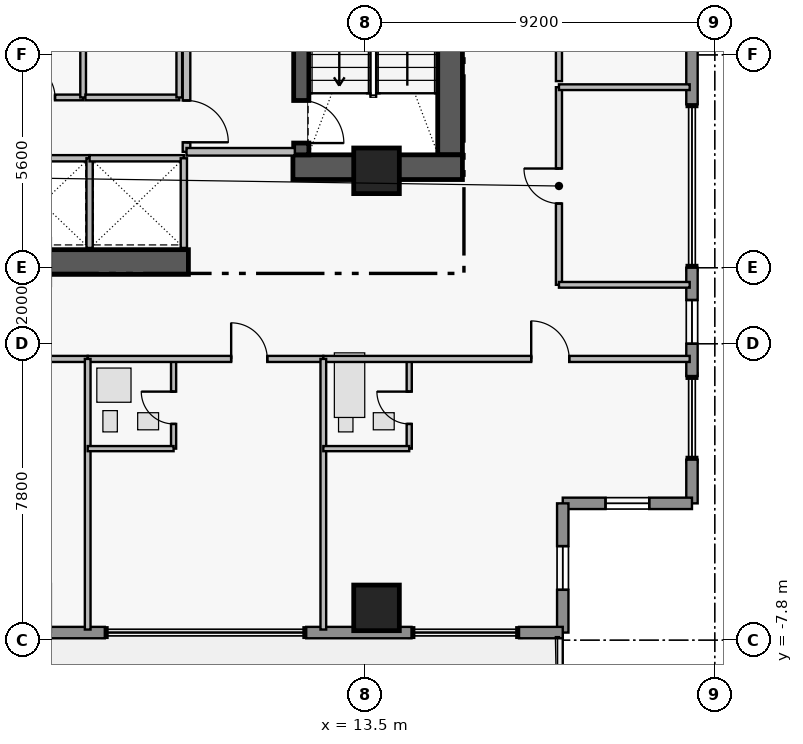
"""IFC4 building model, lengths in metres.
Left out: names, types, materials, properties, quantities, classifications, styles, units other than length and angle.
Written with IfcOpenShell. Run it as: python <this file> out.ifc"""

import sys

from ifc_helpers import new_model, si_unit, direction, frame, frame_2d, origin, origin_2d, place, context, subcontext, project, spatial, rectangle, extrude, element, fill, save


model = new_model("IFC4")
c1 = context("Model", 3, precision=1e-05, world=origin(), true_north=direction((0.0, 1.0)))
c2 = subcontext(c1, "Body", "Model", "MODEL_VIEW")
j1 = project(units=[si_unit("LENGTHUNIT", "METRE"), si_unit("PLANEANGLEUNIT", "RADIAN")], contexts=[c1])
p1 = place(None, origin())
s1 = spatial("IfcSite", under=j1, at=p1, CompositionType="ELEMENT")
p2 = place(p1, origin())
s2 = spatial("IfcBuilding", under=s1, at=p2, CompositionType="ELEMENT")
p3 = place(p2, frame((0.0, 0.0, 192.4)))
s3 = spatial("IfcBuildingStorey", under=s2, at=p3, CompositionType="ELEMENT", Elevation=192.4)
p4 = place(p3, frame((15.735, 4.97, 0.0), z_axis=(0.0, 0.0, 1.0), x_axis=(0.0, 1.0, 0.0)))
e1 = element("IfcWall", 1, at=p4, inside=s3, PredefinedType="SHEAR", context=c2, shape_type="SweptSolid", body=[
    extrude(rectangle(XDim=8.96, YDim=0.65, at=frame_2d((4.48, 0.0))), origin(), (0.0, 0.0, 1.0), 3.56),
])
p5 = place(p3, frame((11.6, 4.645, 0.0), z_axis=(0.0, 0.0, 1.0), x_axis=(1.0, 0.0, 0.0)))
e2 = element("IfcWall", 2, at=p5, inside=s3, PredefinedType="SHEAR", context=c2, shape_type="SweptSolid", body=[
    extrude(rectangle(XDim=4.46, YDim=0.65, at=frame_2d((2.23, 0.0))), origin(), (0.0, 0.0, 1.0), 3.56),
])
p6 = place(p3, frame((1.25, 2.15, 0.0), z_axis=(0.0, 0.0, 1.0), x_axis=(1.0, 0.0, 0.0)))
e3 = element("IfcWall", 3, at=p6, inside=s3, PredefinedType="SHEAR", context=c2, shape_type="SweptSolid", body=[
    extrude(rectangle(XDim=7.6, YDim=0.65, at=frame_2d((3.8, 0.0))), origin(), (0.0, 0.0, 1.0), 3.53),
])
p7 = place(p3, frame((11.82, 13.93, 0.0), z_axis=(0.0, 0.0, 1.0), x_axis=(0.0, -1.0, 0.0)))
e4 = element("IfcWall", 4, at=p7, inside=s3, PredefinedType="SHEAR", context=c2, shape_type="SweptSolid", body=[
    extrude(rectangle(XDim=8.96, YDim=0.4, at=frame_2d((4.48, 0.0))), origin(), (0.0, 0.0, 1.0), 3.56),
])
p8 = place(p7, frame((7.53, 0.0, 0.0)))
e5 = element("IfcOpeningElement", 5, at=p8, cuts=e4, PredefinedType="OPENING", context=c2, shape_type="SweptSolid", body=[
    extrude(rectangle(XDim=1.12, YDim=2.22, at=frame_2d((0.56, 1.11))), frame((0.0, 0.21, 0.0), z_axis=(0.0, -1.0, 0.0), x_axis=(1.0, 0.0, 0.0)), (0.0, 0.0, 1.0), 0.42),
])
for number, where, z_axis, x_axis in (
    (6, (13.8, 4.55, 0.0), (0.0, 0.0, 1.0), (1.0, 0.0, 0.0)),
    (7, (13.8, -6.95, 0.0), (0.0, 0.0, 1.0), (1.0, 0.0, 0.0)),
):
    element("IfcColumn", number, at=place(p3, frame(where, z_axis=z_axis, x_axis=x_axis)), inside=s3, PredefinedType="COLUMN", context=c2, shape_type="SweptSolid", body=[
        extrude(rectangle(XDim=1.2, YDim=1.2, at=origin_2d()), origin(), (0.0, 0.0, 1.0), 3.75),
    ])
p9 = place(p3, frame((22.1, 8.2, 0.0), z_axis=(0.0, 0.0, 1.0), x_axis=(0.0, -1.0, 0.0)))
e8 = element("IfcWall", 8, at=p9, inside=s3, PredefinedType="STANDARD", context=c2, shape_type="SweptSolid", body=[
    extrude(rectangle(XDim=1.9, YDim=0.3, at=frame_2d((0.95, 0.0))), origin(), (0.0, 0.0, 1.0), 3.53),
])
p10 = place(p3, frame((22.1, 2.0, 0.0), z_axis=(0.0, 0.0, 1.0), x_axis=(0.0, -1.0, 0.0)))
e9 = element("IfcWall", 9, at=p10, inside=s3, PredefinedType="STANDARD", context=c2, shape_type="SweptSolid", body=[
    extrude(rectangle(XDim=2.85, YDim=0.3, at=frame_2d((1.425, 0.0))), origin(), (0.0, 0.0, 1.0), 3.53),
])
p11 = place(p10, frame((0.85, 0.0, 0.95)))
e10 = element("IfcOpeningElement", 10, at=p11, cuts=e9, PredefinedType="OPENING", context=c2, shape_type="SweptSolid", body=[
    extrude(rectangle(XDim=1.15, YDim=1.55, at=frame_2d((0.575, 0.775))), frame((0.0, 0.16, 0.0), z_axis=(0.0, -1.0, 0.0), x_axis=(1.0, 0.0, 0.0)), (0.0, 0.0, 1.0), 0.32),
])
p12 = place(p3, frame((22.1, -3.05, 0.0), z_axis=(0.0, 0.0, 1.0), x_axis=(0.0, -1.0, 0.0)))
e11 = element("IfcWall", 11, at=p12, inside=s3, PredefinedType="STANDARD", context=c2, shape_type="SweptSolid", body=[
    extrude(rectangle(XDim=1.15, YDim=0.3, at=frame_2d((0.575, 0.0))), origin(), (0.0, 0.0, 1.0), 3.53),
])
p13 = place(p3, frame((22.1, -4.2, 0.0), z_axis=(0.0, 0.0, 1.0), x_axis=(-1.0, 0.0, 0.0)))
e12 = element("IfcWall", 12, at=p13, inside=s3, PredefinedType="STANDARD", context=c2, shape_type="SweptSolid", body=[
    extrude(rectangle(XDim=3.4, YDim=0.3, at=frame_2d((1.7, 0.0))), origin(), (0.0, 0.0, 1.0), 3.53),
])
p14 = place(p13, frame((1.125, 0.0, 1.25)))
e13 = element("IfcOpeningElement", 13, at=p14, cuts=e12, PredefinedType="OPENING", context=c2, shape_type="SweptSolid", body=[
    extrude(rectangle(XDim=1.15, YDim=1.55, at=frame_2d((0.575, 0.775))), frame((0.0, 0.16, 0.0), z_axis=(0.0, -1.0, 0.0), x_axis=(1.0, 0.0, 0.0)), (0.0, 0.0, 1.0), 0.32),
])
p15 = place(p3, frame((18.7, -4.2, 0.0), z_axis=(0.0, 0.0, 1.0), x_axis=(0.0, -1.0, 0.0)))
e14 = element("IfcWall", 14, at=p15, inside=s3, PredefinedType="STANDARD", context=c2, shape_type="SweptSolid", body=[
    extrude(rectangle(XDim=3.4, YDim=0.3, at=frame_2d((1.7, 0.0))), origin(), (0.0, 0.0, 1.0), 3.53),
])
p16 = place(p15, frame((1.125, 0.0, 1.25)))
e15 = element("IfcOpeningElement", 15, at=p16, cuts=e14, PredefinedType="OPENING", context=c2, shape_type="SweptSolid", body=[
    extrude(rectangle(XDim=1.15, YDim=1.55, at=frame_2d((0.575, 0.775))), frame((0.0, 0.16, 0.0), z_axis=(0.0, -1.0, 0.0), x_axis=(1.0, 0.0, 0.0)), (0.0, 0.0, 1.0), 0.32),
])
p17 = place(p3, frame((18.7, -7.6, 0.0), z_axis=(0.0, 0.0, 1.0), x_axis=(-1.0, 0.0, 0.0)))
e16 = element("IfcWall", 16, at=p17, inside=s3, PredefinedType="STANDARD", context=c2, shape_type="SweptSolid", body=[
    extrude(rectangle(XDim=1.15, YDim=0.3, at=frame_2d((0.575, 0.0))), origin(), (0.0, 0.0, 1.0), 3.53),
])
p18 = place(p3, frame((14.72, -7.6, 0.0), z_axis=(0.0, 0.0, 1.0), x_axis=(-1.0, 0.0, 0.0)))
e17 = element("IfcWall", 17, at=p18, inside=s3, PredefinedType="STANDARD", context=c2, shape_type="SweptSolid", body=[
    extrude(rectangle(XDim=2.77, YDim=0.3, at=frame_2d((1.385, 0.0))), origin(), (0.0, 0.0, 1.0), 3.53),
])
p19 = place(p3, frame((6.65, -7.6, 0.0), z_axis=(0.0, 0.0, 1.0), x_axis=(-1.0, 0.0, 0.0)))
e18 = element("IfcWall", 18, at=p19, inside=s3, PredefinedType="STANDARD", context=c2, shape_type="SweptSolid", body=[
    extrude(rectangle(XDim=2.97, YDim=0.3, at=frame_2d((1.485, 0.0))), origin(), (0.0, 0.0, 1.0), 3.53),
])
p20 = place(p3, frame((8.8, 11.15, 0.0), z_axis=(0.0, 0.0, 1.0), x_axis=(0.0, -1.0, 0.0)))
e19 = element("IfcWall", 19, at=p20, inside=s3, PredefinedType="PARTITIONING", context=c2, shape_type="SweptSolid", body=[
    extrude(rectangle(XDim=6.1, YDim=0.2, at=frame_2d((3.05, 0.0))), origin(), (0.0, 0.0, 1.0), 3.53),
])
p21 = place(p20, frame((1.15, 0.0, 0.0)))
e20 = element("IfcOpeningElement", 20, at=p21, cuts=e19, PredefinedType="OPENING", context=c2, shape_type="SweptSolid", body=[
    extrude(rectangle(XDim=1.1, YDim=2.2, at=frame_2d((0.55, 1.1))), frame((0.0, 0.11, 0.0), z_axis=(0.0, -1.0, 0.0), x_axis=(1.0, 0.0, 0.0)), (0.0, 0.0, 1.0), 0.22),
])
p22 = place(p20, frame((4.75, 0.0, 0.0)))
e21 = element("IfcOpeningElement", 21, at=p22, cuts=e19, PredefinedType="OPENING", context=c2, shape_type="SweptSolid", body=[
    extrude(rectangle(XDim=1.1, YDim=2.2, at=frame_2d((0.55, 1.1))), frame((0.0, 0.11, 0.0), z_axis=(0.0, -1.0, 0.0), x_axis=(1.0, 0.0, 0.0)), (0.0, 0.0, 1.0), 0.22),
])
p23 = place(p3, frame((3.7, 6.48, 0.0), z_axis=(0.0, 0.0, 1.0), x_axis=(1.0, 0.0, 0.0)))
e22 = element("IfcWall", 22, at=p23, inside=s3, PredefinedType="PARTITIONING", context=c2, shape_type="SweptSolid", body=[
    extrude(rectangle(XDim=2.38, YDim=0.15, at=frame_2d((1.19, 0.0))), origin(), (0.0, 0.0, 1.0), 3.53),
])
p24 = place(p23, frame((0.74, 0.0, 0.0)))
e23 = element("IfcOpeningElement", 23, at=p24, cuts=e22, PredefinedType="OPENING", context=c2, shape_type="SweptSolid", body=[
    extrude(rectangle(XDim=0.9, YDim=2.15, at=frame_2d((0.45, 1.075))), frame((0.0, 0.085, 0.0), z_axis=(0.0, -1.0, 0.0), x_axis=(1.0, 0.0, 0.0)), (0.0, 0.0, 1.0), 0.17),
])
p25 = place(p3, frame((0.0, -0.4, 0.0), z_axis=(0.0, 0.0, 1.0), x_axis=(1.0, 0.0, 0.0)))
e24 = element("IfcWall", 24, at=p25, inside=s3, PredefinedType="PARTITIONING", context=c2, shape_type="SweptSolid", body=[
    extrude(rectangle(XDim=6.2, YDim=0.16, at=frame_2d((3.1, 0.0))), origin(), (0.0, 0.0, 1.0), 3.53),
])
p26 = place(p25, frame((3.775, 0.0, 0.0)))
e25 = element("IfcOpeningElement", 25, at=p26, cuts=e24, PredefinedType="OPENING", context=c2, shape_type="SweptSolid", body=[
    extrude(rectangle(XDim=0.95, YDim=2.15, at=frame_2d((0.475, 1.075))), frame((0.0, 0.09, 0.0), z_axis=(0.0, -1.0, 0.0), x_axis=(1.0, 0.0, 0.0)), (0.0, 0.0, 1.0), 0.18),
])
p27 = place(p3, frame((8.46, -2.76, 0.0), z_axis=(0.0, 0.0, 1.0), x_axis=(0.0, 1.0, 0.0)))
e26 = element("IfcWall", 26, at=p27, inside=s3, PredefinedType="PLUMBINGWALL", context=c2, shape_type="SweptSolid", body=[
    extrude(rectangle(XDim=2.36, YDim=0.135, at=frame_2d((1.18, 0.0))), origin(), (0.0, 0.0, 1.0), 3.53),
])
p28 = place(p27, frame((0.65, 0.0, 0.0)))
e27 = element("IfcOpeningElement", 27, at=p28, cuts=e26, PredefinedType="OPENING", context=c2, shape_type="SweptSolid", body=[
    extrude(rectangle(XDim=0.85, YDim=2.1, at=frame_2d((0.425, 1.05))), frame((0.0, 0.077, 0.0), z_axis=(0.0, -1.0, 0.0), x_axis=(1.0, 0.0, 0.0)), (0.0, 0.0, 1.0), 0.155),
])
p29 = place(p3, frame((6.2, -0.4, 0.0), z_axis=(0.0, 0.0, 1.0), x_axis=(1.0, 0.0, 0.0)))
e28 = element("IfcWall", 28, at=p29, inside=s3, PredefinedType="PARTITIONING", context=c2, shape_type="SweptSolid", body=[
    extrude(rectangle(XDim=6.2, YDim=0.16, at=frame_2d((3.1, 0.0))), origin(), (0.0, 0.0, 1.0), 3.53),
])
p30 = place(p29, frame((3.775, 0.0, 0.0)))
e29 = element("IfcOpeningElement", 29, at=p30, cuts=e28, PredefinedType="OPENING", context=c2, shape_type="SweptSolid", body=[
    extrude(rectangle(XDim=0.95, YDim=2.15, at=frame_2d((0.475, 1.075))), frame((0.0, 0.09, 0.0), z_axis=(0.0, -1.0, 0.0), x_axis=(1.0, 0.0, 0.0)), (0.0, 0.0, 1.0), 0.18),
])
p31 = place(p3, frame((14.66, -2.76, 0.0), z_axis=(0.0, 0.0, 1.0), x_axis=(0.0, 1.0, 0.0)))
e30 = element("IfcWall", 30, at=p31, inside=s3, PredefinedType="PLUMBINGWALL", context=c2, shape_type="SweptSolid", body=[
    extrude(rectangle(XDim=2.36, YDim=0.135, at=frame_2d((1.18, 0.0))), origin(), (0.0, 0.0, 1.0), 3.53),
])
p32 = place(p31, frame((0.65, 0.0, 0.0)))
e31 = element("IfcOpeningElement", 31, at=p32, cuts=e30, PredefinedType="OPENING", context=c2, shape_type="SweptSolid", body=[
    extrude(rectangle(XDim=0.85, YDim=2.1, at=frame_2d((0.425, 1.05))), frame((0.0, 0.077, 0.0), z_axis=(0.0, -1.0, 0.0), x_axis=(1.0, 0.0, 0.0)), (0.0, 0.0, 1.0), 0.155),
])
p33 = place(p3, frame((12.4, -0.4, 0.0), z_axis=(0.0, 0.0, 1.0), x_axis=(1.0, 0.0, 0.0)))
e32 = element("IfcWall", 32, at=p33, inside=s3, PredefinedType="PARTITIONING", context=c2, shape_type="SweptSolid", body=[
    extrude(rectangle(XDim=9.64, YDim=0.16, at=frame_2d((4.82, 0.0))), origin(), (0.0, 0.0, 1.0), 3.53),
])
p34 = place(p33, frame((5.47, 0.0, 0.0)))
e33 = element("IfcOpeningElement", 33, at=p34, cuts=e32, PredefinedType="OPENING", context=c2, shape_type="SweptSolid", body=[
    extrude(rectangle(XDim=1.0, YDim=2.15, at=frame_2d((0.5, 1.075))), frame((0.0, 0.09, 0.0), z_axis=(0.0, -1.0, 0.0), x_axis=(1.0, 0.0, 0.0)), (0.0, 0.0, 1.0), 0.18),
])
p35 = place(p3, frame((18.6, 1.55, 0.0), z_axis=(0.0, 0.0, 1.0), x_axis=(0.0, 1.0, 0.0)))
e34 = element("IfcWall", 34, at=p35, inside=s3, PredefinedType="PARTITIONING", context=c2, shape_type="SweptSolid", body=[
    extrude(rectangle(XDim=5.2, YDim=0.16, at=frame_2d((2.6, 0.0))), origin(), (0.0, 0.0, 1.0), 3.53),
])
p36 = place(p35, frame((2.14, 0.0, 0.0)))
e35 = element("IfcOpeningElement", 35, at=p36, cuts=e34, PredefinedType="OPENING", context=c2, shape_type="SweptSolid", body=[
    extrude(rectangle(XDim=0.92, YDim=2.12, at=frame_2d((0.46, 1.06))), frame((0.0, 0.09, 0.0), z_axis=(0.0, -1.0, 0.0), x_axis=(1.0, 0.0, 0.0)), (0.0, 0.0, 1.0), 0.18),
])
p37 = place(p3, frame((18.6, 6.91, 0.0), z_axis=(0.0, 0.0, 1.0), x_axis=(0.0, 1.0, 0.0)))
e36 = element("IfcWall", 36, at=p37, inside=s3, PredefinedType="PARTITIONING", context=c2, shape_type="SweptSolid", body=[
    extrude(rectangle(XDim=7.94, YDim=0.16, at=frame_2d((3.97, 0.0))), origin(), (0.0, 0.0, 1.0), 3.53),
])
p38 = place(p37, frame((3.51, 0.0, 0.0)))
e37 = element("IfcOpeningElement", 37, at=p38, cuts=e36, PredefinedType="OPENING", context=c2, shape_type="SweptSolid", body=[
    extrude(rectangle(XDim=0.92, YDim=2.12, at=frame_2d((0.46, 1.06))), frame((0.0, 0.09, 0.0), z_axis=(0.0, -1.0, 0.0), x_axis=(1.0, 0.0, 0.0)), (0.0, 0.0, 1.0), 0.18),
])
p39 = place(p3, frame((8.8, 5.05, 0.0), z_axis=(0.0, 0.0, 1.0), x_axis=(1.0, 0.0, 0.0)))
e38 = element("IfcWall", 38, at=p39, inside=s3, PredefinedType="PARTITIONING", context=c2, shape_type="SweptSolid", body=[
    extrude(rectangle(XDim=2.85, YDim=0.2, at=frame_2d((1.425, 0.0))), origin(), (0.0, 0.0, 1.0), 3.53),
])
p40 = place(p3, frame((3.75, 4.88, 0.0), z_axis=(0.0, 0.0, 1.0), x_axis=(1.0, 0.0, 0.0)))
e39 = element("IfcWall", 39, at=p40, inside=s3, PredefinedType="PARTITIONING", context=c2, shape_type="SweptSolid", body=[
    extrude(rectangle(XDim=2.5, YDim=0.165, at=frame_2d((1.25, 0.0))), origin(), (0.0, 0.0, 1.0), 3.53),
])
p41 = place(p3, frame((6.25, 2.52, 0.0), z_axis=(0.0, 0.0, 1.0), x_axis=(0.0, 1.0, 0.0)))
e40 = element("IfcWall", 40, at=p41, inside=s3, PredefinedType="PARTITIONING", context=c2, shape_type="SweptSolid", body=[
    extrude(rectangle(XDim=2.36, YDim=0.165, at=frame_2d((1.18, 0.0))), origin(), (0.0, 0.0, 1.0), 3.53),
])
p42 = place(p3, frame((6.25, 4.88, 0.0), z_axis=(0.0, 0.0, 1.0), x_axis=(1.0, 0.0, 0.0)))
e41 = element("IfcWall", 41, at=p42, inside=s3, PredefinedType="PARTITIONING", context=c2, shape_type="SweptSolid", body=[
    extrude(rectangle(XDim=2.48, YDim=0.165, at=frame_2d((1.24, 0.0))), origin(), (0.0, 0.0, 1.0), 3.53),
])
p43 = place(p3, frame((8.73, 2.52, 0.0), z_axis=(0.0, 0.0, 1.0), x_axis=(0.0, 1.0, 0.0)))
e42 = element("IfcWall", 42, at=p43, inside=s3, PredefinedType="PARTITIONING", context=c2, shape_type="SweptSolid", body=[
    extrude(rectangle(XDim=2.36, YDim=0.165, at=frame_2d((1.18, 0.0))), origin(), (0.0, 0.0, 1.0), 3.53),
])
p44 = place(p3, frame((6.08, 6.48, 0.0), z_axis=(0.0, 0.0, 1.0), x_axis=(0.0, 1.0, 0.0)))
e43 = element("IfcWall", 43, at=p44, inside=s3, PredefinedType="PARTITIONING", context=c2, shape_type="SweptSolid", body=[
    extrude(rectangle(XDim=2.24, YDim=0.15, at=frame_2d((1.12, 0.0))), origin(), (0.0, 0.0, 1.0), 3.53),
])
p45 = place(p3, frame((6.14, 6.48, 0.0), z_axis=(0.0, 0.0, 1.0), x_axis=(1.0, 0.0, 0.0)))
e44 = element("IfcWall", 44, at=p45, inside=s3, PredefinedType="PARTITIONING", context=c2, shape_type="SweptSolid", body=[
    extrude(rectangle(XDim=2.47, YDim=0.15, at=frame_2d((1.235, 0.0))), origin(), (0.0, 0.0, 1.0), 3.53),
])
p46 = place(p3, frame((8.61, 6.48, 0.0), z_axis=(0.0, 0.0, 1.0), x_axis=(0.0, 1.0, 0.0)))
e45 = element("IfcWall", 45, at=p46, inside=s3, PredefinedType="PARTITIONING", context=c2, shape_type="SweptSolid", body=[
    extrude(rectangle(XDim=2.24, YDim=0.15, at=frame_2d((1.12, 0.0))), origin(), (0.0, 0.0, 1.0), 3.53),
])
p47 = place(p3, frame((6.2, -7.52, 0.0), z_axis=(0.0, 0.0, 1.0), x_axis=(0.0, 1.0, 0.0)))
e46 = element("IfcWall", 46, at=p47, inside=s3, PredefinedType="PARTITIONING", context=c2, shape_type="SweptSolid", body=[
    extrude(rectangle(XDim=7.12, YDim=0.15, at=frame_2d((3.56, 0.0))), origin(), (0.0, 0.0, 1.0), 3.53),
])
p48 = place(p3, frame((6.2, -2.76, 0.0), z_axis=(0.0, 0.0, 1.0), x_axis=(1.0, 0.0, 0.0)))
e47 = element("IfcWall", 47, at=p48, inside=s3, PredefinedType="PLUMBINGWALL", context=c2, shape_type="SweptSolid", body=[
    extrude(rectangle(XDim=2.26, YDim=0.135, at=frame_2d((1.13, 0.0))), origin(), (0.0, 0.0, 1.0), 3.124),
])
p49 = place(p3, frame((12.4, -7.52, 0.0), z_axis=(0.0, 0.0, 1.0), x_axis=(0.0, 1.0, 0.0)))
e48 = element("IfcWall", 48, at=p49, inside=s3, PredefinedType="PARTITIONING", context=c2, shape_type="SweptSolid", body=[
    extrude(rectangle(XDim=7.12, YDim=0.15, at=frame_2d((3.56, 0.0))), origin(), (0.0, 0.0, 1.0), 3.53),
])
p50 = place(p3, frame((12.4, -2.76, 0.0), z_axis=(0.0, 0.0, 1.0), x_axis=(1.0, 0.0, 0.0)))
e49 = element("IfcWall", 49, at=p50, inside=s3, PredefinedType="PLUMBINGWALL", context=c2, shape_type="SweptSolid", body=[
    extrude(rectangle(XDim=2.26, YDim=0.135, at=frame_2d((1.13, 0.0))), origin(), (0.0, 0.0, 1.0), 3.124),
])
for number, where, z_axis, x_axis in (
    (50, (18.6, 1.55, 0.0), (0.0, 0.0, 1.0), (1.0, 0.0, 0.0)),
    (51, (18.6, 6.75, 0.0), (0.0, 0.0, 1.0), (1.0, 0.0, 0.0)),
):
    element("IfcWall", number, at=place(p3, frame(where, z_axis=z_axis, x_axis=x_axis)), inside=s3, PredefinedType="PARTITIONING", context=c2, shape_type="SweptSolid", body=[
        extrude(rectangle(XDim=3.44, YDim=0.15, at=frame_2d((1.72, 0.0))), origin(), (0.0, 0.0, 1.0), 3.53),
    ])
p51 = place(p11, origin())
e52 = element("IfcWindow", 52, at=p51, inside=s3, PartitioningType="SINGLE_PANEL", PredefinedType="WINDOW", context=c2, shape_type="SweptSolid", body=[
    extrude(rectangle(XDim=1.15, YDim=1.55, at=frame_2d((0.575, 0.775))), frame((0.0, 0.03, 0.0), z_axis=(0.0, -1.0, 0.0), x_axis=(1.0, 0.0, 0.0)), (0.0, 0.0, 1.0), 0.06),
])
fill(e10, e52)
p52 = place(p14, origin())
e53 = element("IfcWindow", 53, at=p52, inside=s3, PartitioningType="SINGLE_PANEL", PredefinedType="WINDOW", context=c2, shape_type="SweptSolid", body=[
    extrude(rectangle(XDim=1.15, YDim=1.55, at=frame_2d((0.575, 0.775))), frame((0.0, 0.03, 0.0), z_axis=(0.0, -1.0, 0.0), x_axis=(1.0, 0.0, 0.0)), (0.0, 0.0, 1.0), 0.06),
])
fill(e13, e53)
p53 = place(p16, origin())
e54 = element("IfcWindow", 54, at=p53, inside=s3, PartitioningType="SINGLE_PANEL", PredefinedType="WINDOW", context=c2, shape_type="SweptSolid", body=[
    extrude(rectangle(XDim=1.15, YDim=1.55, at=frame_2d((0.575, 0.775))), frame((0.0, 0.03, 0.0), z_axis=(0.0, -1.0, 0.0), x_axis=(1.0, 0.0, 0.0)), (0.0, 0.0, 1.0), 0.06),
])
fill(e15, e54)
p54 = place(p8, origin())
e55 = element("IfcDoor", 55, at=p54, inside=s3, OperationType="SINGLE_SWING_RIGHT", PredefinedType="DOOR", context=c2, shape_type="SweptSolid", body=[
    extrude(rectangle(XDim=1.12, YDim=2.22, at=frame_2d((0.56, 1.11))), frame((0.0, 0.025, 0.0), z_axis=(0.0, -1.0, 0.0), x_axis=(1.0, 0.0, 0.0)), (0.0, 0.0, 1.0), 0.05),
])
fill(e5, e55)
p55 = place(p22, origin())
e56 = element("IfcDoor", 56, at=p55, inside=s3, OperationType="SINGLE_SWING_RIGHT", PredefinedType="DOOR", context=c2, shape_type="SweptSolid", body=[
    extrude(rectangle(XDim=1.1, YDim=2.2, at=frame_2d((0.55, 1.1))), frame((0.0, 0.025, 0.0), z_axis=(0.0, -1.0, 0.0), x_axis=(1.0, 0.0, 0.0)), (0.0, 0.0, 1.0), 0.05),
])
fill(e21, e56)
p56 = place(p24, origin())
e57 = element("IfcDoor", 57, at=p56, inside=s3, OperationType="SINGLE_SWING_LEFT", PredefinedType="DOOR", context=c2, shape_type="SweptSolid", body=[
    extrude(rectangle(XDim=0.9, YDim=2.15, at=frame_2d((0.45, 1.075))), frame((0.0, 0.025, 0.0), z_axis=(0.0, -1.0, 0.0), x_axis=(1.0, 0.0, 0.0)), (0.0, 0.0, 1.0), 0.05),
])
fill(e23, e57)
p57 = place(p28, origin())
e58 = element("IfcDoor", 58, at=p57, inside=s3, OperationType="SINGLE_SWING_RIGHT", PredefinedType="DOOR", context=c2, shape_type="SweptSolid", body=[
    extrude(rectangle(XDim=0.85, YDim=2.1, at=frame_2d((0.425, 1.05))), frame((0.0, 0.025, 0.0), z_axis=(0.0, -1.0, 0.0), x_axis=(1.0, 0.0, 0.0)), (0.0, 0.0, 1.0), 0.05),
])
fill(e27, e58)
p58 = place(p30, origin())
e59 = element("IfcDoor", 59, at=p58, inside=s3, OperationType="SINGLE_SWING_LEFT", PredefinedType="DOOR", context=c2, shape_type="SweptSolid", body=[
    extrude(rectangle(XDim=0.95, YDim=2.15, at=frame_2d((0.475, 1.075))), frame((0.0, 0.025, 0.0), z_axis=(0.0, -1.0, 0.0), x_axis=(1.0, 0.0, 0.0)), (0.0, 0.0, 1.0), 0.05),
])
fill(e29, e59)
p59 = place(p32, origin())
e60 = element("IfcDoor", 60, at=p59, inside=s3, OperationType="SINGLE_SWING_RIGHT", PredefinedType="DOOR", context=c2, shape_type="SweptSolid", body=[
    extrude(rectangle(XDim=0.85, YDim=2.1, at=frame_2d((0.425, 1.05))), frame((0.0, 0.025, 0.0), z_axis=(0.0, -1.0, 0.0), x_axis=(1.0, 0.0, 0.0)), (0.0, 0.0, 1.0), 0.05),
])
fill(e31, e60)
p60 = place(p34, origin())
e61 = element("IfcDoor", 61, at=p60, inside=s3, OperationType="SINGLE_SWING_LEFT", PredefinedType="DOOR", context=c2, shape_type="SweptSolid", body=[
    extrude(rectangle(XDim=1.0, YDim=2.15, at=frame_2d((0.5, 1.075))), frame((0.0, 0.025, 0.0), z_axis=(0.0, -1.0, 0.0), x_axis=(1.0, 0.0, 0.0)), (0.0, 0.0, 1.0), 0.05),
])
fill(e33, e61)
p61 = place(p36, origin())
e62 = element("IfcDoor", 62, at=p61, inside=s3, OperationType="SINGLE_SWING_RIGHT", PredefinedType="DOOR", context=c2, shape_type="SweptSolid", body=[
    extrude(rectangle(XDim=0.92, YDim=2.12, at=frame_2d((0.46, 1.06))), frame((0.0, 0.025, 0.0), z_axis=(0.0, -1.0, 0.0), x_axis=(1.0, 0.0, 0.0)), (0.0, 0.0, 1.0), 0.05),
])
fill(e35, e62)
save(model, sys.argv[1])
